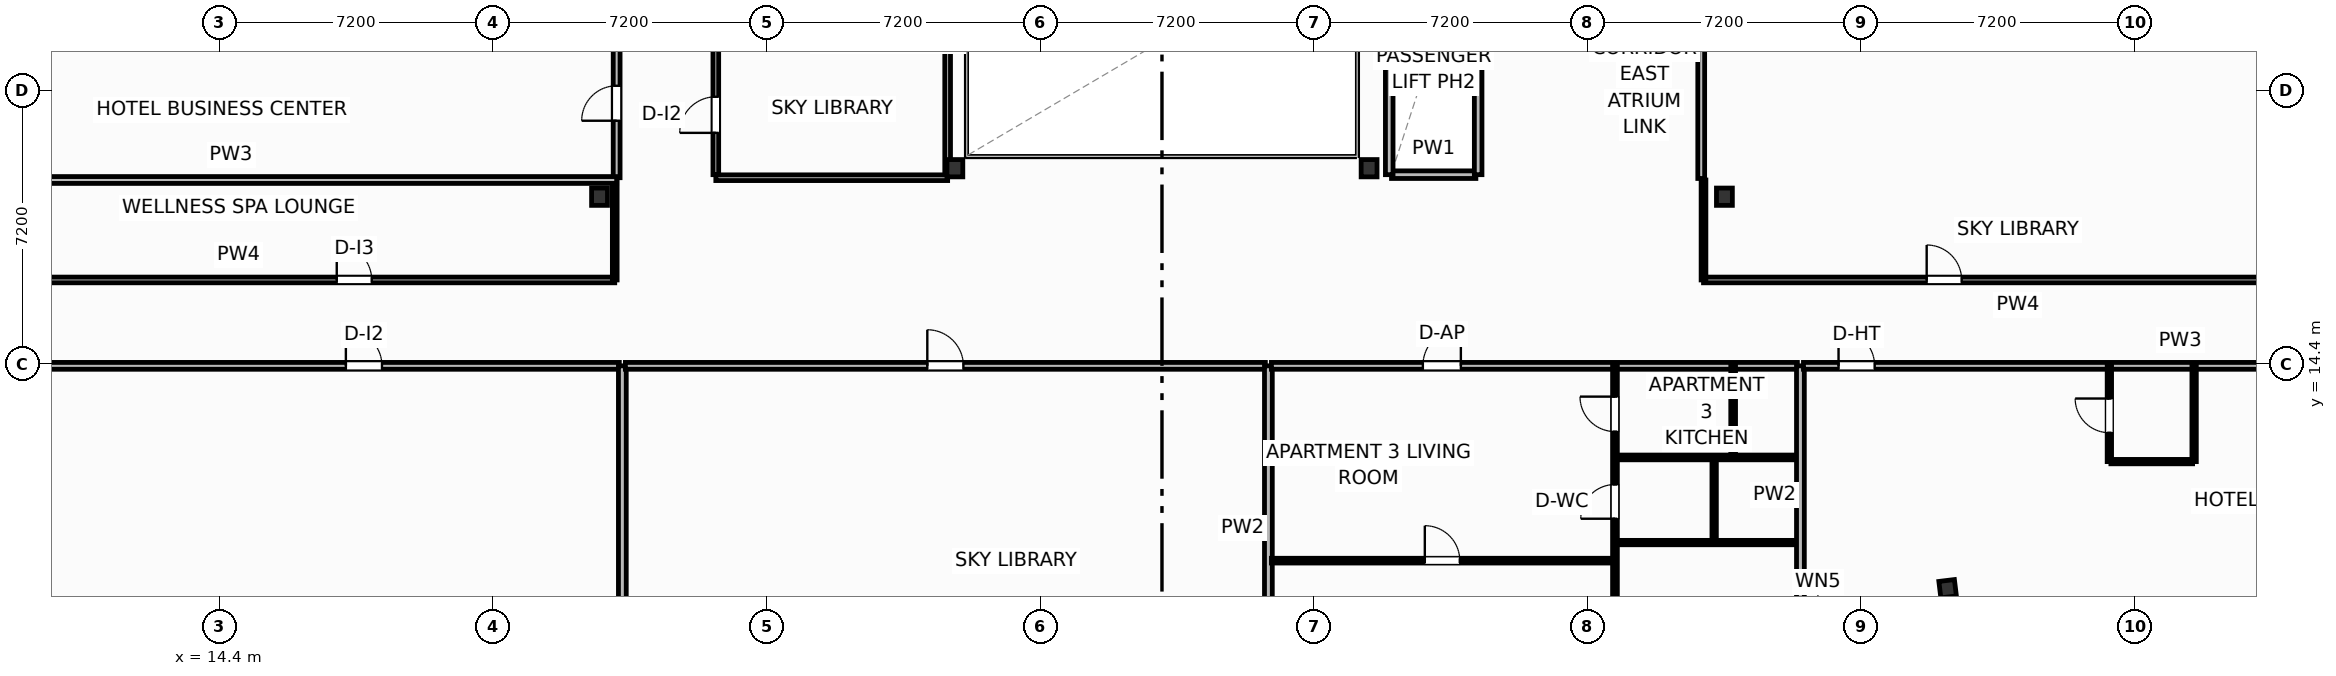
"""IFC4 building model, lengths in metres.
Left out: names, types, materials, properties, quantities, classifications, styles, units other than length and angle.
Written with IfcOpenShell. Run it as: python <this file> out.ifc"""

import sys

from ifc_helpers import new_model, si_unit, direction, frame, frame_2d, origin, origin_2d, place, context, subcontext, project, spatial, rectangle, i_section, extrude, element, fill, save


model = new_model("IFC4")
c1 = context("Model", 3, precision=1e-05, world=origin(), true_north=direction((0.0, 1.0)))
c2 = subcontext(c1, "Body", "Model", "MODEL_VIEW")
j1 = project(units=[si_unit("LENGTHUNIT", "METRE"), si_unit("PLANEANGLEUNIT", "RADIAN")], contexts=[c1])
p1 = place(None, origin())
s1 = spatial("IfcSite", under=j1, at=p1, CompositionType="ELEMENT")
p2 = place(p1, origin())
s2 = spatial("IfcBuilding", under=s1, at=p2, CompositionType="ELEMENT")
p3 = place(p2, frame((0.0, 0.0, 178.3)))
s3 = spatial("IfcBuildingStorey", under=s2, at=p3, CompositionType="ELEMENT", Elevation=178.3)
for number, where, z_axis, x_axis in (
    (1, (33.75, 19.55, 0.0), (0.0, 0.0, 1.0), (1.0, 0.0, 0.0)),
    (2, (44.65, 19.55, 0.0), (0.0, 0.0, 1.0), (1.0, 0.0, 0.0)),
    (3, (24.4, 18.8, 0.0), (0.0, 0.0, 1.0), (1.0, 0.0, 0.0)),
    (4, (54.0, 18.8, 0.0), (0.0, 0.0, 1.0), (1.0, 0.0, 0.0)),
):
    element("IfcColumn", number, at=place(p3, frame(where, z_axis=z_axis, x_axis=x_axis)), inside=s3, PredefinedType="COLUMN", context=c2, shape_type="SweptSolid", body=[
        extrude(i_section(OverallWidth=0.418, OverallDepth=0.455, WebThickness=0.042, FlangeThickness=0.068, FilletRadius=0.025, at=origin_2d()), origin(), (0.0, 0.0, 1.0), 3.7),
    ])
p4 = place(p3, frame((59.874, 8.486, 0.0), z_axis=(0.0, 0.0, 1.0), x_axis=(0.992732158755, 0.12034475881, 0.0)))
e5 = element("IfcColumn", 5, at=p4, inside=s3, PredefinedType="COLUMN", context=c2, shape_type="SweptSolid", body=[
    extrude(i_section(OverallWidth=0.412, OverallDepth=0.435, WebThickness=0.036, FlangeThickness=0.057, FilletRadius=0.025, at=origin_2d()), origin(), (0.0, 0.0, 1.0), 3.7),
])
p5 = place(p3, frame((5.0, 16.61, 0.0), z_axis=(0.0, 0.0, 1.0), x_axis=(1.0, 0.0, 0.0)))
e6 = element("IfcWall", 6, at=p5, inside=s3, PredefinedType="PARTITIONING", context=c2, shape_type="SweptSolid", body=[
    extrude(rectangle(XDim=19.8, YDim=0.15, at=frame_2d((9.9, 0.0))), origin(), (0.0, 0.0, 1.0), 3.45),
])
p6 = place(p5, frame((12.485, 0.0, 0.0)))
e7 = element("IfcOpeningElement", 7, at=p6, cuts=e6, PredefinedType="OPENING", context=c2, shape_type="SweptSolid", body=[
    extrude(rectangle(XDim=0.92, YDim=2.05, at=frame_2d((0.46, 1.025))), frame((0.0, 0.085, 0.0), z_axis=(0.0, -1.0, 0.0), x_axis=(1.0, 0.0, 0.0)), (0.0, 0.0, 1.0), 0.17),
])
p7 = place(p3, frame((24.8, 16.61, 0.0), z_axis=(0.0, 0.0, 1.0), x_axis=(0.0, 1.0, 0.0)))
e8 = element("IfcWall", 8, at=p7, inside=s3, PredefinedType="PARTITIONING", context=c2, shape_type="SweptSolid", body=[
    extrude(rectangle(XDim=2.63, YDim=0.125, at=frame_2d((1.315, 0.0))), origin(), (0.0, 0.0, 1.0), 3.45),
])
p8 = place(p3, frame((53.45, 16.61, 0.0), z_axis=(0.0, 0.0, 1.0), x_axis=(1.0, 0.0, 0.0)))
e9 = element("IfcWall", 9, at=p8, inside=s3, PredefinedType="PARTITIONING", context=c2, shape_type="SweptSolid", body=[
    extrude(rectangle(XDim=16.55, YDim=0.15, at=frame_2d((8.275, 0.0))), origin(), (0.0, 0.0, 1.0), 3.45),
])
p9 = place(p8, frame((5.873, 0.0, 0.0)))
e10 = element("IfcOpeningElement", 10, at=p9, cuts=e9, PredefinedType="OPENING", context=c2, shape_type="SweptSolid", body=[
    extrude(rectangle(XDim=0.92, YDim=2.05, at=frame_2d((0.46, 1.025))), frame((0.0, 0.085, 0.0), z_axis=(0.0, -1.0, 0.0), x_axis=(1.0, 0.0, 0.0)), (0.0, 0.0, 1.0), 0.17),
])
p10 = place(p3, frame((53.45, 16.61, 0.0), z_axis=(0.0, 0.0, 1.0), x_axis=(0.0, 1.0, 0.0)))
e11 = element("IfcWall", 11, at=p10, inside=s3, PredefinedType="PARTITIONING", context=c2, shape_type="SweptSolid", body=[
    extrude(rectangle(XDim=2.63, YDim=0.125, at=frame_2d((1.315, 0.0))), origin(), (0.0, 0.0, 1.0), 2.662),
])
p11 = place(p3, frame((5.15, 14.35, 0.0), z_axis=(0.0, 0.0, 1.0), x_axis=(1.0, 0.0, 0.0)))
e12 = element("IfcWall", 12, at=p11, inside=s3, PredefinedType="PARTITIONING", context=c2, shape_type="SweptSolid", body=[
    extrude(rectangle(XDim=19.77, YDim=0.18, at=frame_2d((9.885, 0.0))), origin(), (0.0, 0.0, 1.0), 3.45),
])
p12 = place(p11, frame((12.575, 0.0, 0.0)))
e13 = element("IfcOpeningElement", 13, at=p12, cuts=e12, PredefinedType="OPENING", context=c2, shape_type="SweptSolid", body=[
    extrude(rectangle(XDim=0.95, YDim=2.05, at=frame_2d((0.475, 1.025))), frame((0.0, 0.1, 0.0), z_axis=(0.0, -1.0, 0.0), x_axis=(1.0, 0.0, 0.0)), (0.0, 0.0, 1.0), 0.2),
])
p13 = place(p3, frame((25.0, 3.775, 0.0), z_axis=(0.0, 0.0, 1.0), x_axis=(0.0, 1.0, 0.0)))
e14 = element("IfcWall", 14, at=p13, inside=s3, PredefinedType="PARTITIONING", context=c2, shape_type="SweptSolid", body=[
    extrude(rectangle(XDim=10.575, YDim=0.205, at=frame_2d((5.288, 0.0))), origin(), (0.0, 0.0, 1.0), 3.45),
])
p14 = place(p3, frame((25.08, 14.35, 0.0), z_axis=(0.0, 0.0, 1.0), x_axis=(1.0, 0.0, 0.0)))
e15 = element("IfcWall", 15, at=p14, inside=s3, PredefinedType="PARTITIONING", context=c2, shape_type="SweptSolid", body=[
    extrude(rectangle(XDim=16.84, YDim=0.18, at=frame_2d((8.42, 0.0))), origin(), (0.0, 0.0, 1.0), 3.45),
])
p15 = place(p14, frame((7.945, 0.0, 0.0)))
e16 = element("IfcOpeningElement", 16, at=p15, cuts=e15, PredefinedType="OPENING", context=c2, shape_type="SweptSolid", body=[
    extrude(rectangle(XDim=0.95, YDim=2.05, at=frame_2d((0.475, 1.025))), frame((0.0, 0.1, 0.0), z_axis=(0.0, -1.0, 0.0), x_axis=(1.0, 0.0, 0.0)), (0.0, 0.0, 1.0), 0.2),
])
p16 = place(p3, frame((42.0, 5.835, 0.0), z_axis=(0.0, 0.0, 1.0), x_axis=(0.0, 1.0, 0.0)))
e17 = element("IfcWall", 17, at=p16, inside=s3, PredefinedType="PARTITIONING", context=c2, shape_type="SweptSolid", body=[
    extrude(rectangle(XDim=8.515, YDim=0.205, at=frame_2d((4.257, 0.0))), origin(), (0.0, 0.0, 1.0), 2.662),
])
p17 = place(p3, frame((42.08, 9.224, 0.0), z_axis=(0.0, 0.0, 1.0), x_axis=(1.0, 0.0, 0.0)))
e18 = element("IfcWall", 18, at=p17, inside=s3, PredefinedType="PARTITIONING", context=c2, shape_type="SweptSolid", body=[
    extrude(rectangle(XDim=8.97, YDim=0.125, at=frame_2d((4.485, 0.0))), origin(), (0.0, 0.0, 1.0), 3.45),
])
p18 = place(p17, frame((4.037, 0.0, 0.0)))
e19 = element("IfcOpeningElement", 19, at=p18, cuts=e18, PredefinedType="OPENING", context=c2, shape_type="SweptSolid", body=[
    extrude(rectangle(XDim=0.92, YDim=2.05, at=frame_2d((0.46, 1.025))), frame((0.0, 0.073, 0.0), z_axis=(0.0, -1.0, 0.0), x_axis=(1.0, 0.0, 0.0)), (0.0, 0.0, 1.0), 0.145),
])
p19 = place(p3, frame((42.08, 14.35, 0.0), z_axis=(0.0, 0.0, 1.0), x_axis=(1.0, 0.0, 0.0)))
e20 = element("IfcWall", 20, at=p19, inside=s3, PredefinedType="PARTITIONING", context=c2, shape_type="SweptSolid", body=[
    extrude(rectangle(XDim=13.84, YDim=0.18, at=frame_2d((6.92, 0.0))), origin(), (0.0, 0.0, 1.0), 3.45),
])
p20 = place(p19, frame((3.985, 0.0, 0.0)))
e21 = element("IfcOpeningElement", 21, at=p20, cuts=e20, PredefinedType="OPENING", context=c2, shape_type="SweptSolid", body=[
    extrude(rectangle(XDim=1.0, YDim=2.2, at=frame_2d((0.5, 1.1))), frame((0.0, 0.1, 0.0), z_axis=(0.0, -1.0, 0.0), x_axis=(1.0, 0.0, 0.0)), (0.0, 0.0, 1.0), 0.2),
])
p21 = place(p3, frame((51.12, 4.826, 0.0), z_axis=(0.0, 0.0, 1.0), x_axis=(0.0, 1.0, 0.0)))
e22 = element("IfcWall", 22, at=p21, inside=s3, PredefinedType="PARTITIONING", context=c2, shape_type="SweptSolid", body=[
    extrude(rectangle(XDim=9.524, YDim=0.125, at=frame_2d((4.762, 0.0))), origin(), (0.0, 0.0, 1.0), 2.662),
])
p22 = place(p21, frame((0.725, 0.0, 0.0)))
e23 = element("IfcOpeningElement", 23, at=p22, cuts=e22, PredefinedType="OPENING", context=c2, shape_type="SweptSolid", body=[
    extrude(rectangle(XDim=0.92, YDim=2.05, at=frame_2d((0.46, 1.025))), frame((0.0, 0.073, 0.0), z_axis=(0.0, -1.0, 0.0), x_axis=(1.0, 0.0, 0.0)), (0.0, 0.0, 1.0), 0.145),
])
p23 = place(p21, frame((5.502, 0.0, 0.0)))
e24 = element("IfcOpeningElement", 24, at=p23, cuts=e22, PredefinedType="OPENING", context=c2, shape_type="SweptSolid", body=[
    extrude(rectangle(XDim=0.9, YDim=2.05, at=frame_2d((0.45, 1.025))), frame((0.0, 0.073, 0.0), z_axis=(0.0, -1.0, 0.0), x_axis=(1.0, 0.0, 0.0)), (0.0, 0.0, 1.0), 0.145),
])
p24 = place(p21, frame((7.794, 0.0, 0.0)))
e25 = element("IfcOpeningElement", 25, at=p24, cuts=e22, PredefinedType="OPENING", context=c2, shape_type="SweptSolid", body=[
    extrude(rectangle(XDim=0.92, YDim=2.05, at=frame_2d((0.46, 1.025))), frame((0.0, 0.073, 0.0), z_axis=(0.0, -1.0, 0.0), x_axis=(1.0, 0.0, 0.0)), (0.0, 0.0, 1.0), 0.145),
])
p25 = place(p3, frame((51.19, 11.94, 0.0), z_axis=(0.0, 0.0, 1.0), x_axis=(1.0, 0.0, 0.0)))
e26 = element("IfcWall", 26, at=p25, inside=s3, PredefinedType="PARTITIONING", context=c2, shape_type="SweptSolid", body=[
    extrude(rectangle(XDim=4.73, YDim=0.125, at=frame_2d((2.365, 0.0))), origin(), (0.0, 0.0, 1.0), 3.018),
])
p26 = place(p3, frame((51.19, 9.7, 0.0), z_axis=(0.0, 0.0, 1.0), x_axis=(1.0, 0.0, 0.0)))
e27 = element("IfcWall", 27, at=p26, inside=s3, PredefinedType="PARTITIONING", context=c2, shape_type="SweptSolid", body=[
    extrude(rectangle(XDim=4.73, YDim=0.115, at=frame_2d((2.365, 0.0))), origin(), (0.0, 0.0, 1.0), 3.45),
])
p27 = place(p3, frame((54.23, 11.94, 0.0), z_axis=(0.0, 0.0, 1.0), x_axis=(0.0, 1.0, 0.0)))
e28 = element("IfcWall", 28, at=p27, inside=s3, PredefinedType="PARTITIONING", context=c2, shape_type="SweptSolid", body=[
    extrude(rectangle(XDim=2.41, YDim=0.125, at=frame_2d((1.205, 0.0))), origin(), (0.0, 0.0, 1.0), 3.45),
])
p28 = place(p3, frame((53.73, 9.7, 0.0), z_axis=(0.0, 0.0, 1.0), x_axis=(0.0, 1.0, 0.0)))
e29 = element("IfcWall", 29, at=p28, inside=s3, PredefinedType="PARTITIONING", context=c2, shape_type="SweptSolid", body=[
    extrude(rectangle(XDim=2.24, YDim=0.115, at=frame_2d((1.12, 0.0))), origin(), (0.0, 0.0, 1.0), 3.45),
])
p29 = place(p3, frame((56.0, 7.533, 0.0), z_axis=(0.0, 0.0, 1.0), x_axis=(0.0, 1.0, 0.0)))
e30 = element("IfcWall", 30, at=p29, inside=s3, PredefinedType="PARTITIONING", context=c2, shape_type="SweptSolid", body=[
    extrude(rectangle(XDim=6.817, YDim=0.205, at=frame_2d((3.409, 0.0))), origin(), (0.0, 0.0, 1.0), 3.45),
])
p30 = place(p3, frame((56.08, 14.35, 0.0), z_axis=(0.0, 0.0, 1.0), x_axis=(1.0, 0.0, 0.0)))
e31 = element("IfcWall", 31, at=p30, inside=s3, PredefinedType="PARTITIONING", context=c2, shape_type="SweptSolid", body=[
    extrude(rectangle(XDim=19.825, YDim=0.18, at=frame_2d((9.912, 0.0))), origin(), (0.0, 0.0, 1.0), 3.45),
])
p31 = place(p30, frame((0.923, 0.0, 0.0)))
e32 = element("IfcOpeningElement", 32, at=p31, cuts=e31, PredefinedType="OPENING", context=c2, shape_type="SweptSolid", body=[
    extrude(rectangle(XDim=0.95, YDim=2.15, at=frame_2d((0.475, 1.075))), frame((0.0, 0.1, 0.0), z_axis=(0.0, -1.0, 0.0), x_axis=(1.0, 0.0, 0.0)), (0.0, 0.0, 1.0), 0.2),
])
p32 = place(p3, frame((64.17, 11.83, 0.0), z_axis=(0.0, 0.0, 1.0), x_axis=(1.0, 0.0, 0.0)))
e33 = element("IfcWall", 33, at=p32, inside=s3, PredefinedType="PARTITIONING", context=c2, shape_type="SweptSolid", body=[
    extrude(rectangle(XDim=2.15, YDim=0.115, at=frame_2d((1.075, 0.0))), origin(), (0.0, 0.0, 1.0), 3.45),
])
p33 = place(p3, frame((64.13, 11.83, 0.0), z_axis=(0.0, 0.0, 1.0), x_axis=(0.0, 1.0, 0.0)))
e34 = element("IfcWall", 34, at=p33, inside=s3, PredefinedType="PARTITIONING", context=c2, shape_type="SweptSolid", body=[
    extrude(rectangle(XDim=2.52, YDim=0.115, at=frame_2d((1.26, 0.0))), origin(), (0.0, 0.0, 1.0), 3.45),
])
p34 = place(p33, frame((0.76, 0.0, 0.0)))
e35 = element("IfcOpeningElement", 35, at=p34, cuts=e34, PredefinedType="OPENING", context=c2, shape_type="SweptSolid", body=[
    extrude(rectangle(XDim=0.9, YDim=2.05, at=frame_2d((0.45, 1.025))), frame((0.0, 0.067, 0.0), z_axis=(0.0, -1.0, 0.0), x_axis=(1.0, 0.0, 0.0)), (0.0, 0.0, 1.0), 0.135),
])
p35 = place(p3, frame((66.36, 11.83, 0.0), z_axis=(0.0, 0.0, 1.0), x_axis=(0.0, 1.0, 0.0)))
e36 = element("IfcWall", 36, at=p35, inside=s3, PredefinedType="PARTITIONING", context=c2, shape_type="SweptSolid", body=[
    extrude(rectangle(XDim=2.52, YDim=0.115, at=frame_2d((1.26, 0.0))), origin(), (0.0, 0.0, 1.0), 3.45),
])
p36 = place(p3, frame((24.85, 19.3, 0.0), z_axis=(0.0, 0.0, 1.0), x_axis=(0.0, 1.0, 0.0)))
e37 = element("IfcWall", 37, at=p36, inside=s3, PredefinedType="PARTITIONING", context=c2, shape_type="SweptSolid", body=[
    extrude(rectangle(XDim=3.57, YDim=0.18, at=frame_2d((1.785, 0.0))), origin(), (0.0, 0.0, 1.0), 3.45),
])
p37 = place(p36, frame((1.5, 0.0, 0.0)))
e38 = element("IfcOpeningElement", 38, at=p37, cuts=e37, PredefinedType="OPENING", context=c2, shape_type="SweptSolid", body=[
    extrude(rectangle(XDim=0.92, YDim=2.05, at=frame_2d((0.46, 1.025))), frame((0.0, 0.1, 0.0), z_axis=(0.0, -1.0, 0.0), x_axis=(1.0, 0.0, 0.0)), (0.0, 0.0, 1.0), 0.2),
])
p38 = place(p3, frame((4.557, 19.24, 0.0), z_axis=(0.0, 0.0, 1.0), x_axis=(1.0, 0.0, 0.0)))
e39 = element("IfcWall", 39, at=p38, inside=s3, PredefinedType="PARTITIONING", context=c2, shape_type="SweptSolid", body=[
    extrude(rectangle(XDim=20.293, YDim=0.18, at=frame_2d((10.146, 0.0))), origin(), (0.0, 0.0, 1.0), 3.45),
])
p39 = place(p3, frame((53.39, 19.28, 0.0), z_axis=(0.0, 0.0, 1.0), x_axis=(0.0, 1.0, 0.0)))
e40 = element("IfcWall", 40, at=p39, inside=s3, PredefinedType="PARTITIONING", context=c2, shape_type="SweptSolid", body=[
    extrude(rectangle(XDim=20.02, YDim=0.18, at=frame_2d((10.01, 0.0))), origin(), (0.0, 0.0, 1.0), 3.45),
])
p40 = place(p39, frame((8.07, 0.0, 0.0)))
e41 = element("IfcOpeningElement", 41, at=p40, cuts=e40, PredefinedType="OPENING", context=c2, shape_type="SweptSolid", body=[
    extrude(rectangle(XDim=0.92, YDim=2.05, at=frame_2d((0.46, 1.025))), frame((0.0, 0.1, 0.0), z_axis=(0.0, -1.0, 0.0), x_axis=(1.0, 0.0, 0.0)), (0.0, 0.0, 1.0), 0.2),
])
p41 = place(p3, frame((27.46, 19.3, 0.0), z_axis=(0.0, 0.0, 1.0), x_axis=(1.0, 0.0, 0.0)))
e42 = element("IfcWall", 42, at=p41, inside=s3, PredefinedType="PARTITIONING", context=c2, shape_type="SweptSolid", body=[
    extrude(rectangle(XDim=6.1, YDim=0.15, at=frame_2d((3.05, 0.0))), origin(), (0.0, 0.0, 1.0), 2.662),
])
p42 = place(p3, frame((27.46, 19.38, 0.0), z_axis=(0.0, 0.0, 1.0), x_axis=(0.0, 1.0, 0.0)))
e43 = element("IfcWall", 43, at=p42, inside=s3, PredefinedType="PARTITIONING", context=c2, shape_type="SweptSolid", body=[
    extrude(rectangle(XDim=7.16, YDim=0.15, at=frame_2d((3.58, 0.0))), origin(), (0.0, 0.0, 1.0), 3.45),
])
p43 = place(p42, frame((1.1, 0.0, 0.0)))
e44 = element("IfcOpeningElement", 44, at=p43, cuts=e43, PredefinedType="OPENING", context=c2, shape_type="SweptSolid", body=[
    extrude(rectangle(XDim=0.95, YDim=2.05, at=frame_2d((0.475, 1.025))), frame((0.0, 0.085, 0.0), z_axis=(0.0, -1.0, 0.0), x_axis=(1.0, 0.0, 0.0)), (0.0, 0.0, 1.0), 0.17),
])
p44 = place(p3, frame((33.56, 19.38, 0.0), z_axis=(0.0, 0.0, 1.0), x_axis=(0.0, 1.0, 0.0)))
e45 = element("IfcWall", 45, at=p44, inside=s3, PredefinedType="PARTITIONING", context=c2, shape_type="SweptSolid", body=[
    extrude(rectangle(XDim=7.16, YDim=0.15, at=frame_2d((3.58, 0.0))), origin(), (0.0, 0.0, 1.0), 2.824),
])
p45 = place(p3, frame((45.24, 21.675, 0.0), z_axis=(0.0, 0.0, 1.0), x_axis=(1.0, 0.0, 0.0)))
e46 = element("IfcWall", 46, at=p45, inside=s3, PredefinedType="PARTITIONING", context=c2, shape_type="SweptSolid", body=[
    extrude(rectangle(XDim=2.22, YDim=0.2, at=frame_2d((1.11, 0.0))), origin(), (0.0, 0.0, 1.0), 3.45),
])
p46 = place(p3, frame((45.24, 19.38, 0.0), z_axis=(0.0, 0.0, 1.0), x_axis=(1.0, 0.0, 0.0)))
e47 = element("IfcWall", 47, at=p46, inside=s3, PredefinedType="PARTITIONING", context=c2, shape_type="SweptSolid", body=[
    extrude(rectangle(XDim=2.22, YDim=0.2, at=frame_2d((1.11, 0.0))), origin(), (0.0, 0.0, 1.0), 2.662),
])
for number, where, z_axis, x_axis in (
    (48, (45.18, 19.38, 0.0), (0.0, 0.0, 1.0), (0.0, 1.0, 0.0)),
    (49, (47.52, 19.38, 0.0), (0.0, 0.0, 1.0), (0.0, 1.0, 0.0)),
):
    element("IfcWall", number, at=place(p3, frame(where, z_axis=z_axis, x_axis=x_axis)), inside=s3, PredefinedType="PARTITIONING", context=c2, shape_type="SweptSolid", body=[
        extrude(rectangle(XDim=6.9, YDim=0.2, at=frame_2d((3.45, 0.0))), origin(), (0.0, 0.0, 1.0), 3.45),
    ])
p47 = place(p6, origin())
e50 = element("IfcDoor", 50, at=p47, inside=s3, OperationType="SINGLE_SWING_LEFT", PredefinedType="DOOR", context=c2, shape_type="SweptSolid", body=[
    extrude(rectangle(XDim=0.92, YDim=2.05, at=frame_2d((0.46, 1.025))), frame((0.0, 0.025, 0.0), z_axis=(0.0, -1.0, 0.0), x_axis=(1.0, 0.0, 0.0)), (0.0, 0.0, 1.0), 0.05),
])
fill(e7, e50)
p48 = place(p9, origin())
e51 = element("IfcDoor", 51, at=p48, inside=s3, OperationType="SINGLE_SWING_LEFT", PredefinedType="DOOR", context=c2, shape_type="SweptSolid", body=[
    extrude(rectangle(XDim=0.92, YDim=2.05, at=frame_2d((0.46, 1.025))), frame((0.0, 0.025, 0.0), z_axis=(0.0, -1.0, 0.0), x_axis=(1.0, 0.0, 0.0)), (0.0, 0.0, 1.0), 0.05),
])
fill(e10, e51)
p49 = place(p12, origin())
e52 = element("IfcDoor", 52, at=p49, inside=s3, OperationType="SINGLE_SWING_LEFT", PredefinedType="DOOR", context=c2, shape_type="SweptSolid", body=[
    extrude(rectangle(XDim=0.95, YDim=2.05, at=frame_2d((0.475, 1.025))), frame((0.0, 0.025, 0.0), z_axis=(0.0, -1.0, 0.0), x_axis=(1.0, 0.0, 0.0)), (0.0, 0.0, 1.0), 0.05),
])
fill(e13, e52)
p50 = place(p15, origin())
e53 = element("IfcDoor", 53, at=p50, inside=s3, OperationType="SINGLE_SWING_LEFT", PredefinedType="DOOR", context=c2, shape_type="SweptSolid", body=[
    extrude(rectangle(XDim=0.95, YDim=2.05, at=frame_2d((0.475, 1.025))), frame((0.0, 0.025, 0.0), z_axis=(0.0, -1.0, 0.0), x_axis=(1.0, 0.0, 0.0)), (0.0, 0.0, 1.0), 0.05),
])
fill(e16, e53)
p51 = place(p18, origin())
e54 = element("IfcDoor", 54, at=p51, inside=s3, OperationType="SINGLE_SWING_LEFT", PredefinedType="DOOR", context=c2, shape_type="SweptSolid", body=[
    extrude(rectangle(XDim=0.92, YDim=2.05, at=frame_2d((0.46, 1.025))), frame((0.0, 0.025, 0.0), z_axis=(0.0, -1.0, 0.0), x_axis=(1.0, 0.0, 0.0)), (0.0, 0.0, 1.0), 0.05),
])
fill(e19, e54)
p52 = place(p20, origin())
e55 = element("IfcDoor", 55, at=p52, inside=s3, OperationType="SINGLE_SWING_RIGHT", PredefinedType="DOOR", context=c2, shape_type="SweptSolid", body=[
    extrude(rectangle(XDim=1.0, YDim=2.2, at=frame_2d((0.5, 1.1))), frame((0.0, 0.025, 0.0), z_axis=(0.0, -1.0, 0.0), x_axis=(1.0, 0.0, 0.0)), (0.0, 0.0, 1.0), 0.05),
])
fill(e21, e55)
p53 = place(p23, origin())
e56 = element("IfcDoor", 56, at=p53, inside=s3, OperationType="SINGLE_SWING_LEFT", PredefinedType="DOOR", context=c2, shape_type="SweptSolid", body=[
    extrude(rectangle(XDim=0.9, YDim=2.05, at=frame_2d((0.45, 1.025))), frame((0.0, 0.025, 0.0), z_axis=(0.0, -1.0, 0.0), x_axis=(1.0, 0.0, 0.0)), (0.0, 0.0, 1.0), 0.05),
])
fill(e24, e56)
p54 = place(p24, origin())
e57 = element("IfcDoor", 57, at=p54, inside=s3, OperationType="SINGLE_SWING_RIGHT", PredefinedType="DOOR", context=c2, shape_type="SweptSolid", body=[
    extrude(rectangle(XDim=0.92, YDim=2.05, at=frame_2d((0.46, 1.025))), frame((0.0, 0.025, 0.0), z_axis=(0.0, -1.0, 0.0), x_axis=(1.0, 0.0, 0.0)), (0.0, 0.0, 1.0), 0.05),
])
fill(e25, e57)
p55 = place(p31, origin())
e58 = element("IfcDoor", 58, at=p55, inside=s3, OperationType="SINGLE_SWING_LEFT", PredefinedType="DOOR", context=c2, shape_type="SweptSolid", body=[
    extrude(rectangle(XDim=0.95, YDim=2.15, at=frame_2d((0.475, 1.075))), frame((0.0, 0.025, 0.0), z_axis=(0.0, -1.0, 0.0), x_axis=(1.0, 0.0, 0.0)), (0.0, 0.0, 1.0), 0.05),
])
fill(e32, e58)
p56 = place(p34, origin())
e59 = element("IfcDoor", 59, at=p56, inside=s3, OperationType="SINGLE_SWING_RIGHT", PredefinedType="DOOR", context=c2, shape_type="SweptSolid", body=[
    extrude(rectangle(XDim=0.9, YDim=2.05, at=frame_2d((0.45, 1.025))), frame((0.0, 0.025, 0.0), z_axis=(0.0, -1.0, 0.0), x_axis=(1.0, 0.0, 0.0)), (0.0, 0.0, 1.0), 0.05),
])
fill(e35, e59)
p57 = place(p37, origin())
e60 = element("IfcDoor", 60, at=p57, inside=s3, OperationType="SINGLE_SWING_LEFT", PredefinedType="DOOR", context=c2, shape_type="SweptSolid", body=[
    extrude(rectangle(XDim=0.92, YDim=2.05, at=frame_2d((0.46, 1.025))), frame((0.0, 0.025, 0.0), z_axis=(0.0, -1.0, 0.0), x_axis=(1.0, 0.0, 0.0)), (0.0, 0.0, 1.0), 0.05),
])
fill(e38, e60)
p58 = place(p43, origin())
e61 = element("IfcDoor", 61, at=p58, inside=s3, OperationType="SINGLE_SWING_LEFT", PredefinedType="DOOR", context=c2, shape_type="SweptSolid", body=[
    extrude(rectangle(XDim=0.95, YDim=2.05, at=frame_2d((0.475, 1.025))), frame((0.0, 0.025, 0.0), z_axis=(0.0, -1.0, 0.0), x_axis=(1.0, 0.0, 0.0)), (0.0, 0.0, 1.0), 0.05),
])
fill(e44, e61)
save(model, sys.argv[1])
